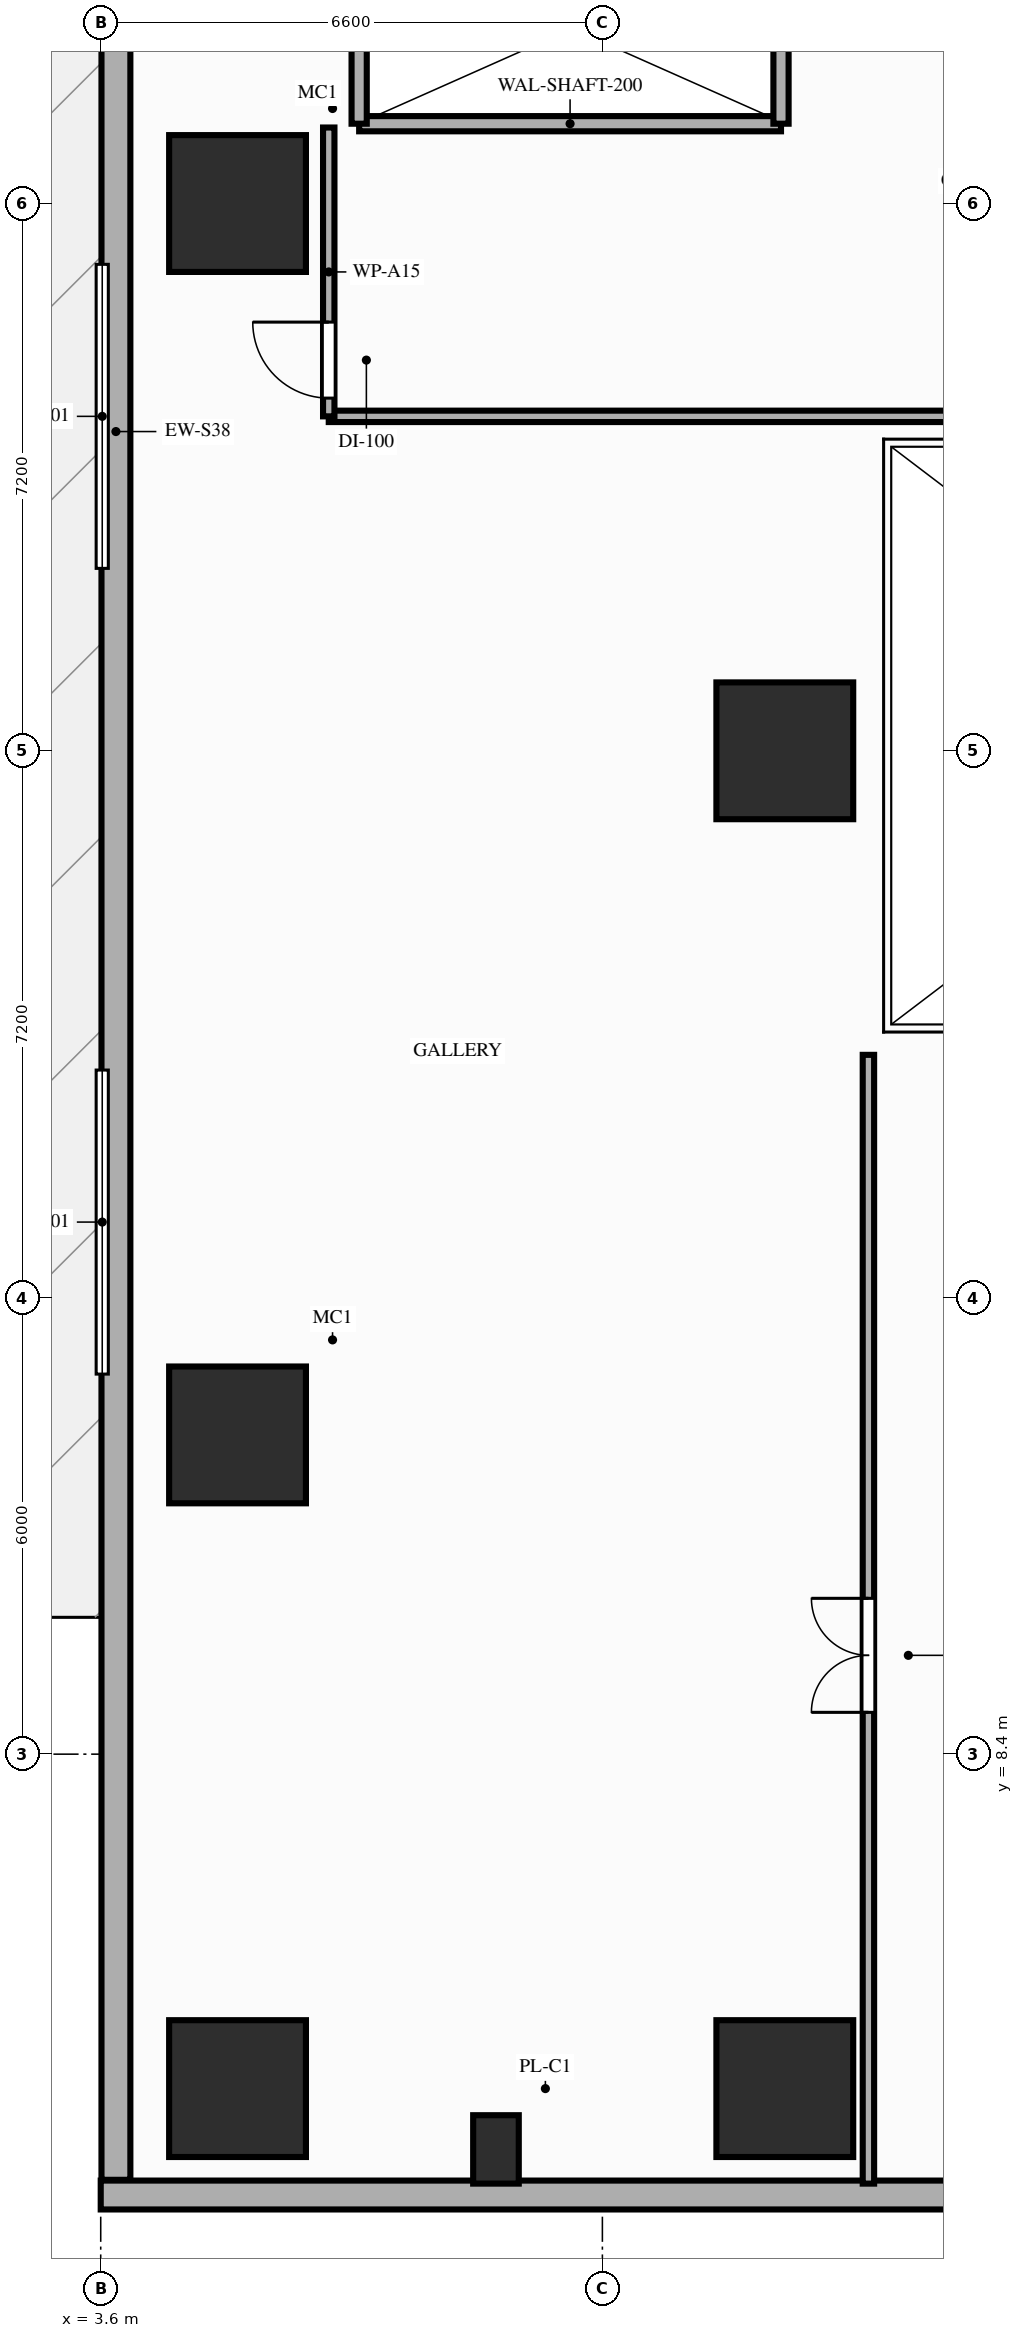
"""IFC4 building model, lengths in metres.
Left out: names, types, materials, properties, quantities, classifications, styles, units other than length and angle.
Written with IfcOpenShell. Run it as: python <this file> out.ifc"""

import sys

from ifc_helpers import new_model, si_unit, direction, frame, frame_2d, origin, origin_2d, place, context, subcontext, project, spatial, rectangle, extrude, element, fill, save


model = new_model("IFC4")
c1 = context("Model", 3, precision=1e-05, world=origin(), true_north=direction((0.0, 1.0)))
c2 = subcontext(c1, "Body", "Model", "MODEL_VIEW")
j1 = project(units=[si_unit("LENGTHUNIT", "METRE"), si_unit("PLANEANGLEUNIT", "RADIAN")], contexts=[c1])
p1 = place(None, origin())
s1 = spatial("IfcSite", under=j1, at=p1, CompositionType="ELEMENT")
p2 = place(p1, origin())
s2 = spatial("IfcBuilding", under=s1, at=p2, CompositionType="ELEMENT")
p3 = place(p2, frame((0.0, 0.0, 4.6)))
s3 = spatial("IfcBuildingStorey", under=s2, at=p3, CompositionType="ELEMENT", Elevation=4.6)
for number, where, z_axis, x_axis in (
    (1, (5.4, 12.6, 0.0), (0.0, 0.0, 1.0), (1.0, 0.0, 0.0)),
    (2, (5.4, 28.8, 0.0), (0.0, 0.0, 1.0), (1.0, 0.0, 0.0)),
    (3, (5.4, 4.0, 0.0), (0.0, 0.0, 1.0), (1.0, 0.0, 0.0)),
    (4, (12.6, 4.0, 0.0), (0.0, 0.0, 1.0), (1.0, 0.0, 0.0)),
    (5, (12.6, 21.6, 0.0), (0.0, 0.0, 1.0), (1.0, 0.0, 0.0)),
):
    element("IfcColumn", number, at=place(p3, frame(where, z_axis=z_axis, x_axis=x_axis)), inside=s3, PredefinedType="COLUMN", context=c2, shape_type="SweptSolid", body=[
        extrude(rectangle(XDim=1.8, YDim=1.8, at=origin_2d()), origin(), (0.0, 0.0, 1.0), 4.2),
    ])
p4 = place(p3, frame((8.8, 3.2, 0.0), z_axis=(0.0, 0.0, 1.0), x_axis=(1.0, 0.0, 0.0)))
e6 = element("IfcColumn", 6, at=p4, inside=s3, PredefinedType="PILASTER", context=c2, shape_type="SweptSolid", body=[
    extrude(rectangle(XDim=0.6, YDim=0.9, at=origin_2d()), origin(), (0.0, 0.0, 1.0), 4.2),
])
p5 = place(p3, frame((3.6, 2.6, 0.0), z_axis=(0.0, 0.0, 1.0), x_axis=(1.0, 0.0, 0.0)))
e7 = element("IfcWall", 7, at=p5, inside=s3, PredefinedType="STANDARD", context=c2, shape_type="SweptSolid", body=[
    extrude(rectangle(XDim=69.6, YDim=0.38, at=frame_2d((34.8, 0.0))), origin(), (0.0, 0.0, 1.0), 3.95),
])
p6 = place(p5, frame((17.2, 0.0, 0.9)))
e8 = element("IfcOpeningElement", 8, at=p6, cuts=e7, PredefinedType="OPENING", context=c2, shape_type="SweptSolid", body=[
    extrude(rectangle(XDim=2.8, YDim=2.2, at=frame_2d((1.4, 1.1))), frame((0.0, 0.2, 0.0), z_axis=(0.0, -1.0, 0.0), x_axis=(1.0, 0.0, 0.0)), (0.0, 0.0, 1.0), 0.4),
])
p7 = place(p5, frame((24.6, 0.0, 0.9)))
e9 = element("IfcOpeningElement", 9, at=p7, cuts=e7, PredefinedType="OPENING", context=c2, shape_type="SweptSolid", body=[
    extrude(rectangle(XDim=2.8, YDim=2.2, at=frame_2d((1.4, 1.1))), frame((0.0, 0.2, 0.0), z_axis=(0.0, -1.0, 0.0), x_axis=(1.0, 0.0, 0.0)), (0.0, 0.0, 1.0), 0.4),
])
p8 = place(p5, frame((36.2, 0.0, 0.9)))
e10 = element("IfcOpeningElement", 10, at=p8, cuts=e7, PredefinedType="OPENING", context=c2, shape_type="SweptSolid", body=[
    extrude(rectangle(XDim=2.8, YDim=2.2, at=frame_2d((1.4, 1.1))), frame((0.0, 0.2, 0.0), z_axis=(0.0, -1.0, 0.0), x_axis=(1.0, 0.0, 0.0)), (0.0, 0.0, 1.0), 0.4),
])
p9 = place(p5, frame((48.4, 0.0, 0.9)))
e11 = element("IfcOpeningElement", 11, at=p9, cuts=e7, PredefinedType="OPENING", context=c2, shape_type="SweptSolid", body=[
    extrude(rectangle(XDim=2.8, YDim=2.2, at=frame_2d((1.4, 1.1))), frame((0.0, 0.2, 0.0), z_axis=(0.0, -1.0, 0.0), x_axis=(1.0, 0.0, 0.0)), (0.0, 0.0, 1.0), 0.4),
])
p10 = place(p5, frame((64.0, 0.0, 0.9)))
e12 = element("IfcOpeningElement", 12, at=p10, cuts=e7, PredefinedType="OPENING", context=c2, shape_type="SweptSolid", body=[
    extrude(rectangle(XDim=2.8, YDim=2.2, at=frame_2d((1.4, 1.1))), frame((0.0, 0.2, 0.0), z_axis=(0.0, -1.0, 0.0), x_axis=(1.0, 0.0, 0.0)), (0.0, 0.0, 1.0), 0.4),
])
p11 = place(p3, frame((3.8, 48.8, 0.0), z_axis=(0.0, 0.0, 1.0), x_axis=(0.0, -1.0, 0.0)))
e13 = element("IfcWall", 13, at=p11, inside=s3, PredefinedType="STANDARD", context=c2, shape_type="SweptSolid", body=[
    extrude(rectangle(XDim=46.0, YDim=0.38, at=frame_2d((23.0, 0.0))), origin(), (0.0, 0.0, 1.0), 3.95),
])
p12 = place(p3, frame((7.0, 29.85, 0.0), z_axis=(0.0, 0.0, 1.0), x_axis=(1.0, 0.0, 0.0)))
e14 = element("IfcWall", 14, at=p12, inside=s3, PredefinedType="MOVABLE", context=c2, shape_type="SweptSolid", body=[
    extrude(rectangle(XDim=5.55, YDim=0.2, at=frame_2d((2.775, 0.0))), origin(), (0.0, 0.0, 1.0), 3.95),
])
for number, where, z_axis, x_axis in (
    (15, (7.0, 29.85, 0.0), (0.0, 0.0, 1.0), (0.0, 1.0, 0.0)),
    (16, (12.55, 29.85, 0.0), (0.0, 0.0, 1.0), (0.0, 1.0, 0.0)),
):
    element("IfcWall", number, at=place(p3, frame(where, z_axis=z_axis, x_axis=x_axis)), inside=s3, PredefinedType="MOVABLE", context=c2, shape_type="SweptSolid", body=[
        extrude(rectangle(XDim=2.5, YDim=0.2, at=frame_2d((1.25, 0.0))), origin(), (0.0, 0.0, 1.0), 3.95),
    ])
p13 = place(p3, frame((6.6, 26.0, 0.0), z_axis=(0.0, 0.0, 1.0), x_axis=(1.0, 0.0, 0.0)))
e17 = element("IfcWall", 17, at=p13, inside=s3, PredefinedType="PARTITIONING", context=c2, shape_type="SweptSolid", body=[
    extrude(rectangle(XDim=17.8, YDim=0.15, at=frame_2d((8.9, 0.0))), origin(), (0.0, 0.0, 1.0), 3.23),
])
p14 = place(p3, frame((6.6, 26.0, 0.0), z_axis=(0.0, 0.0, 1.0), x_axis=(0.0, 1.0, 0.0)))
e18 = element("IfcWall", 18, at=p14, inside=s3, PredefinedType="PARTITIONING", context=c2, shape_type="SweptSolid", body=[
    extrude(rectangle(XDim=3.8, YDim=0.15, at=frame_2d((1.9, 0.0))), origin(), (0.0, 0.0, 1.0), 3.23),
])
p15 = place(p14, frame((0.24, 0.0, 0.0)))
e19 = element("IfcOpeningElement", 19, at=p15, cuts=e18, PredefinedType="OPENING", context=c2, shape_type="SweptSolid", body=[
    extrude(rectangle(XDim=1.0, YDim=2.15, at=frame_2d((0.5, 1.075))), frame((0.0, 0.085, 0.0), z_axis=(0.0, -1.0, 0.0), x_axis=(1.0, 0.0, 0.0)), (0.0, 0.0, 1.0), 0.17),
])
p16 = place(p3, frame((13.7, 2.75, 0.0), z_axis=(0.0, 0.0, 1.0), x_axis=(0.0, 1.0, 0.0)))
e20 = element("IfcWall", 20, at=p16, inside=s3, PredefinedType="PARTITIONING", context=c2, shape_type="SweptSolid", body=[
    extrude(rectangle(XDim=14.85, YDim=0.15, at=frame_2d((7.425, 0.0))), origin(), (0.0, 0.0, 1.0), 3.03),
])
p17 = place(p16, frame((6.2, 0.0, 0.0)))
e21 = element("IfcOpeningElement", 21, at=p17, cuts=e20, PredefinedType="OPENING", context=c2, shape_type="SweptSolid", body=[
    extrude(rectangle(XDim=1.5, YDim=2.18, at=frame_2d((0.75, 1.09))), frame((0.0, 0.085, 0.0), z_axis=(0.0, -1.0, 0.0), x_axis=(1.0, 0.0, 0.0)), (0.0, 0.0, 1.0), 0.17),
])
p18 = place(p15, origin())
e22 = element("IfcDoor", 22, at=p18, inside=s3, OperationType="SINGLE_SWING_RIGHT", PredefinedType="DOOR", context=c2, shape_type="SweptSolid", body=[
    extrude(rectangle(XDim=1.0, YDim=2.15, at=frame_2d((0.5, 1.075))), frame((0.0, 0.025, 0.0), z_axis=(0.0, -1.0, 0.0), x_axis=(1.0, 0.0, 0.0)), (0.0, 0.0, 1.0), 0.05),
])
fill(e19, e22)
p19 = place(p17, origin())
e23 = element("IfcDoor", 23, at=p19, inside=s3, OperationType="DOUBLE_DOOR_SINGLE_SWING", PredefinedType="DOOR", context=c2, shape_type="SweptSolid", body=[
    extrude(rectangle(XDim=1.5, YDim=2.18, at=frame_2d((0.75, 1.09))), frame((0.0, 0.025, 0.0), z_axis=(0.0, -1.0, 0.0), x_axis=(1.0, 0.0, 0.0)), (0.0, 0.0, 1.0), 0.05),
])
fill(e21, e23)
save(model, sys.argv[1])
